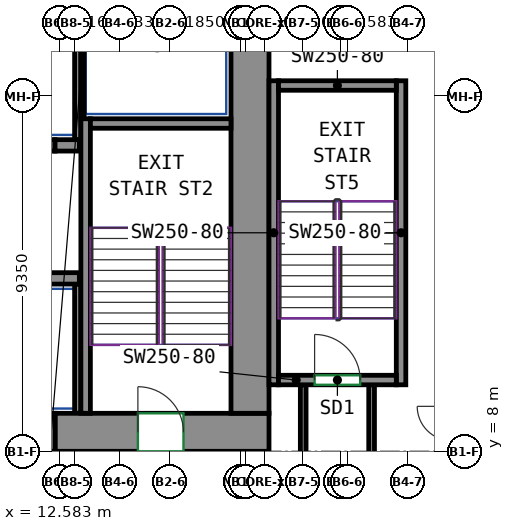
"""IFC4 building model, lengths in metres.
Left out: names, types, materials, properties, quantities, classifications, styles, units other than length and angle.
Written with IfcOpenShell. Run it as: python <this file> out.ifc"""

import sys

from ifc_helpers import new_model, si_unit, direction, frame, frame_2d, origin, place, context, subcontext, project, spatial, rectangle, extrude, source, transform, mapped, element, fill, save


model = new_model("IFC4")
c1 = context("Model", 3, precision=1e-05, world=origin(), true_north=direction((0.0, 1.0)))
c2 = subcontext(c1, "Body", "Model", "MODEL_VIEW")
j1 = project(units=[si_unit("LENGTHUNIT", "METRE"), si_unit("PLANEANGLEUNIT", "RADIAN")], contexts=[c1])
p1 = place(None, origin())
s1 = spatial("IfcSite", under=j1, at=p1, CompositionType="ELEMENT")
p2 = place(p1, origin())
s2 = spatial("IfcBuilding", under=s1, at=p2, CompositionType="ELEMENT")
p3 = place(p2, frame((0.0, 0.0, 43.0)))
s3 = spatial("IfcBuildingStorey", under=s2, at=p3, CompositionType="ELEMENT", Elevation=43.0)
m1 = source(origin(), c2, "Body", "SweptSolid", [
    extrude(rectangle(XDim=5.63, YDim=1.0, at=frame_2d((2.815, 0.0))), origin(), (0.0, 0.0, 1.0), 3.72),
])
p4 = place(p3, frame((12.47, 8.5, 0.0), z_axis=(0.0, 0.0, 1.0), x_axis=(1.0, 0.0, 0.0)))
e1 = element("IfcWall", 1, at=p4, inside=s3, PredefinedType="SHEAR", context=c2, shape_type="MappedRepresentation", body=[
    mapped(m1, transform((0.0, 0.0, 0.0))),
])
p5 = place(p4, frame((2.18, 0.0, 0.0)))
e2 = element("IfcOpeningElement", 2, at=p5, cuts=e1, PredefinedType="OPENING", context=c2, shape_type="SweptSolid", body=[
    extrude(rectangle(XDim=1.2, YDim=2.1, at=frame_2d((0.6, 1.05))), frame((0.0, 0.51, 0.0), z_axis=(0.0, -1.0, 0.0), x_axis=(1.0, 0.0, 0.0)), (0.0, 0.0, 1.0), 1.02),
])
m2 = source(origin(), c2, "Body", "SweptSolid", [
    extrude(rectangle(XDim=12.0, YDim=1.0, at=frame_2d((6.0, 0.0))), origin(), (0.0, 0.0, 1.0), 3.72),
])
p6 = place(p3, frame((17.6, 9.0, 0.0), z_axis=(0.0, 0.0, 1.0), x_axis=(0.0, 1.0, 0.0)))
e3 = element("IfcWall", 3, at=p6, inside=s3, PredefinedType="SHEAR", context=c2, shape_type="MappedRepresentation", body=[
    mapped(m2, transform((0.0, 0.0, 0.0))),
])
m3 = source(origin(), c2, "Body", "SweptSolid", [
    extrude(rectangle(XDim=7.75, YDim=0.25, at=frame_2d((3.875, 0.0))), origin(), (0.0, 0.0, 1.0), 3.72),
])
p7 = place(p3, frame((13.275, 9.0, 0.0), z_axis=(0.0, 0.0, 1.0), x_axis=(0.0, 1.0, 0.0)))
e4 = element("IfcWall", 4, at=p7, inside=s3, PredefinedType="SHEAR", context=c2, shape_type="MappedRepresentation", body=[
    mapped(m3, transform((0.0, 0.0, 0.0))),
])
m4 = source(origin(), c2, "Body", "SweptSolid", [
    extrude(rectangle(XDim=3.7, YDim=0.25, at=frame_2d((1.85, 0.0))), origin(), (0.0, 0.0, 1.0), 3.72),
])
p8 = place(p3, frame((13.4, 16.625, 0.0), z_axis=(0.0, 0.0, 1.0), x_axis=(1.0, 0.0, 0.0)))
e5 = element("IfcWall", 5, at=p8, inside=s3, PredefinedType="SHEAR", context=c2, shape_type="MappedRepresentation", body=[
    mapped(m4, transform((0.0, 0.0, 0.0))),
])
m5 = source(origin(), c2, "Body", "SweptSolid", [
    extrude(rectangle(XDim=8.0, YDim=0.25, at=frame_2d((4.0, 0.0))), origin(), (0.0, 0.0, 1.0), 3.72),
])
for number, where, z_axis, x_axis in (
    (6, (18.225, 9.75, 0.0), (0.0, 0.0, 1.0), (0.0, 1.0, 0.0)),
    (7, (21.575, 9.75, 0.0), (0.0, 0.0, 1.0), (0.0, 1.0, 0.0)),
):
    element("IfcWall", number, at=place(p3, frame(where, z_axis=z_axis, x_axis=x_axis)), inside=s3, PredefinedType="SHEAR", context=c2, shape_type="MappedRepresentation", body=[
        mapped(m5, transform((0.0, 0.0, 0.0))),
    ])
m6 = source(origin(), c2, "Body", "SweptSolid", [
    extrude(rectangle(XDim=3.1, YDim=0.25, at=frame_2d((1.55, 0.0))), origin(), (0.0, 0.0, 1.0), 3.72),
])
p9 = place(p3, frame((18.35, 9.875, 0.0), z_axis=(0.0, 0.0, 1.0), x_axis=(1.0, 0.0, 0.0)))
e8 = element("IfcWall", 8, at=p9, inside=s3, PredefinedType="SHEAR", context=c2, shape_type="MappedRepresentation", body=[
    mapped(m6, transform((0.0, 0.0, 0.0))),
])
p10 = place(p9, frame((0.95, 0.0, 0.0)))
e9 = element("IfcOpeningElement", 9, at=p10, cuts=e8, PredefinedType="OPENING", context=c2, shape_type="SweptSolid", body=[
    extrude(rectangle(XDim=1.2, YDim=2.1, at=frame_2d((0.6, 1.05))), frame((0.0, 0.135, 0.0), z_axis=(0.0, -1.0, 0.0), x_axis=(1.0, 0.0, 0.0)), (0.0, 0.0, 1.0), 0.27),
])
p11 = place(p3, frame((18.35, 17.625, 0.0), z_axis=(0.0, 0.0, 1.0), x_axis=(1.0, 0.0, 0.0)))
e10 = element("IfcWall", 10, at=p11, inside=s3, PredefinedType="SHEAR", context=c2, shape_type="MappedRepresentation", body=[
    mapped(m6, transform((0.0, 0.0, 0.0))),
])
m7 = source(origin(), c2, "Body", "SweptSolid", [
    extrude(rectangle(XDim=2.82, YDim=0.3, at=frame_2d((1.41, 0.0))), origin(), (0.0, 0.0, 1.0), 3.72),
])
p12 = place(p3, frame((10.29, 12.55, 0.0), z_axis=(0.0, 0.0, 1.0), x_axis=(1.0, 0.0, 0.0)))
e11 = element("IfcWall", 11, at=p12, inside=s3, PredefinedType="SHEAR", context=c2, shape_type="MappedRepresentation", body=[
    mapped(m7, transform((0.0, 0.0, 0.0))),
])
m8 = source(origin(), c2, "Body", "SweptSolid", [
    extrude(rectangle(XDim=0.64, YDim=0.3, at=frame_2d((0.32, 0.0))), origin(), (0.0, 0.0, 1.0), 3.72),
])
p13 = place(p3, frame((12.47, 16.05, 0.0), z_axis=(0.0, 0.0, 1.0), x_axis=(1.0, 0.0, 0.0)))
e12 = element("IfcWall", 12, at=p13, inside=s3, PredefinedType="SHEAR", context=c2, shape_type="MappedRepresentation", body=[
    mapped(m8, transform((0.0, 0.0, 0.0))),
])
m9 = source(origin(), c2, "Body", "SweptSolid", [
    extrude(rectangle(XDim=1.4, YDim=0.3, at=frame_2d((0.7, 0.0))), origin(), (0.0, 0.0, 1.0), 3.72),
])
p14 = place(p3, frame((11.07, 16.05, 0.0), z_axis=(0.0, 0.0, 1.0), x_axis=(1.0, 0.0, 0.0)))
e13 = element("IfcWall", 13, at=p14, inside=s3, PredefinedType="PARTITIONING", context=c2, shape_type="MappedRepresentation", body=[
    mapped(m9, transform((0.0, 0.0, 0.0))),
])
p15 = place(p14, frame((0.15, 0.0, 0.0)))
e14 = element("IfcOpeningElement", 14, at=p15, cuts=e13, PredefinedType="OPENING", context=c2, shape_type="SweptSolid", body=[
    extrude(rectangle(XDim=1.1, YDim=2.1, at=frame_2d((0.55, 1.05))), frame((0.0, 0.16, 0.0), z_axis=(0.0, -1.0, 0.0), x_axis=(1.0, 0.0, 0.0)), (0.0, 0.0, 1.0), 0.32),
])
m10 = source(origin(), c2, "Body", "SweptSolid", [
    extrude(rectangle(XDim=3.275, YDim=0.165, at=frame_2d((1.638, 0.0))), origin(), (0.0, 0.0, 1.0), 3.72),
])
p16 = place(p3, frame((13.067, 16.2, 0.0), z_axis=(0.0, 0.0, 1.0), x_axis=(0.0, 1.0, 0.0)))
e15 = element("IfcWall", 15, at=p16, inside=s3, PredefinedType="PARTITIONING", context=c2, shape_type="MappedRepresentation", body=[
    mapped(m10, transform((0.0, 0.0, 0.0))),
])
m11 = source(origin(), c2, "Body", "SweptSolid", [
    extrude(rectangle(XDim=2.725, YDim=0.085, at=frame_2d((1.363, 0.0))), origin(), (0.0, 0.0, 1.0), 3.72),
])
p17 = place(p3, frame((13.192, 16.75, 0.0), z_axis=(0.0, 0.0, 1.0), x_axis=(0.0, 1.0, 0.0)))
e16 = element("IfcWall", 16, at=p17, inside=s3, PredefinedType="PARTITIONING", context=c2, shape_type="MappedRepresentation", body=[
    mapped(m11, transform((0.0, 0.0, 0.0))),
])
m12 = source(origin(), c2, "Body", "SweptSolid", [
    extrude(rectangle(XDim=3.4, YDim=0.165, at=frame_2d((1.7, 0.0))), origin(), (0.0, 0.0, 1.0), 3.72),
])
p18 = place(p3, frame((13.067, 9.0, 0.0), z_axis=(0.0, 0.0, 1.0), x_axis=(0.0, 1.0, 0.0)))
e17 = element("IfcWall", 17, at=p18, inside=s3, PredefinedType="PARTITIONING", context=c2, shape_type="MappedRepresentation", body=[
    mapped(m12, transform((0.0, 0.0, 0.0))),
])
m13 = source(origin(), c2, "Body", "SweptSolid", [
    extrude(rectangle(XDim=1.4, YDim=1.0, at=frame_2d((0.7, 0.0))), origin(), (0.0, 0.0, 1.0), 2.7),
])
p19 = place(p3, frame((11.07, 8.5, 0.0), z_axis=(0.0, 0.0, 1.0), x_axis=(1.0, 0.0, 0.0)))
e18 = element("IfcWall", 18, at=p19, inside=s3, PredefinedType="PARTITIONING", context=c2, shape_type="MappedRepresentation", body=[
    mapped(m13, transform((0.0, 0.0, 0.0))),
])
p20 = place(p19, frame((0.25, 0.0, 0.0)))
e19 = element("IfcOpeningElement", 19, at=p20, cuts=e18, PredefinedType="OPENING", context=c2, shape_type="SweptSolid", body=[
    extrude(rectangle(XDim=0.9, YDim=2.1, at=frame_2d((0.45, 1.05))), frame((0.0, 0.51, 0.0), z_axis=(0.0, -1.0, 0.0), x_axis=(1.0, 0.0, 0.0)), (0.0, 0.0, 1.0), 1.02),
])
p21 = place(p3, frame((19.0, 9.75, 0.0), z_axis=(0.0, 0.0, 1.0), x_axis=(0.0, -1.0, 0.0)))
e20 = element("IfcWall", 20, at=p21, inside=s3, PredefinedType="PARTITIONING", context=c2, shape_type="SweptSolid", body=[
    extrude(rectangle(XDim=6.55, YDim=0.15, at=frame_2d((3.275, 0.0))), origin(), (0.0, 0.0, 1.0), 3.72),
])
p22 = place(p3, frame((20.8, 3.275, 0.0), z_axis=(0.0, 0.0, 1.0), x_axis=(0.0, 1.0, 0.0)))
e21 = element("IfcWall", 21, at=p22, inside=s3, PredefinedType="PARTITIONING", context=c2, shape_type="SweptSolid", body=[
    extrude(rectangle(XDim=6.475, YDim=0.15, at=frame_2d((3.238, 0.0))), origin(), (0.0, 0.0, 1.0), 3.72),
])
p23 = place(p5, origin())
e22 = element("IfcDoor", 22, at=p23, inside=s3, OperationType="DOUBLE_DOOR_SINGLE_SWING", PredefinedType="DOOR", context=c2, shape_type="SweptSolid", body=[
    extrude(rectangle(XDim=1.2, YDim=2.1, at=frame_2d((0.6, 1.05))), frame((0.0, 0.405, 0.0), z_axis=(0.0, -1.0, 0.0), x_axis=(1.0, 0.0, 0.0)), (0.0, 0.0, 1.0), 0.05),
])
fill(e2, e22)
p24 = place(p10, origin())
e23 = element("IfcDoor", 23, at=p24, inside=s3, OperationType="DOUBLE_DOOR_SINGLE_SWING", PredefinedType="DOOR", context=c2, shape_type="SweptSolid", body=[
    extrude(rectangle(XDim=1.2, YDim=2.1, at=frame_2d((0.6, 1.05))), frame((0.0, 0.025, 0.0), z_axis=(0.0, -1.0, 0.0), x_axis=(1.0, 0.0, 0.0)), (0.0, 0.0, 1.0), 0.05),
])
fill(e9, e23)
save(model, sys.argv[1])
